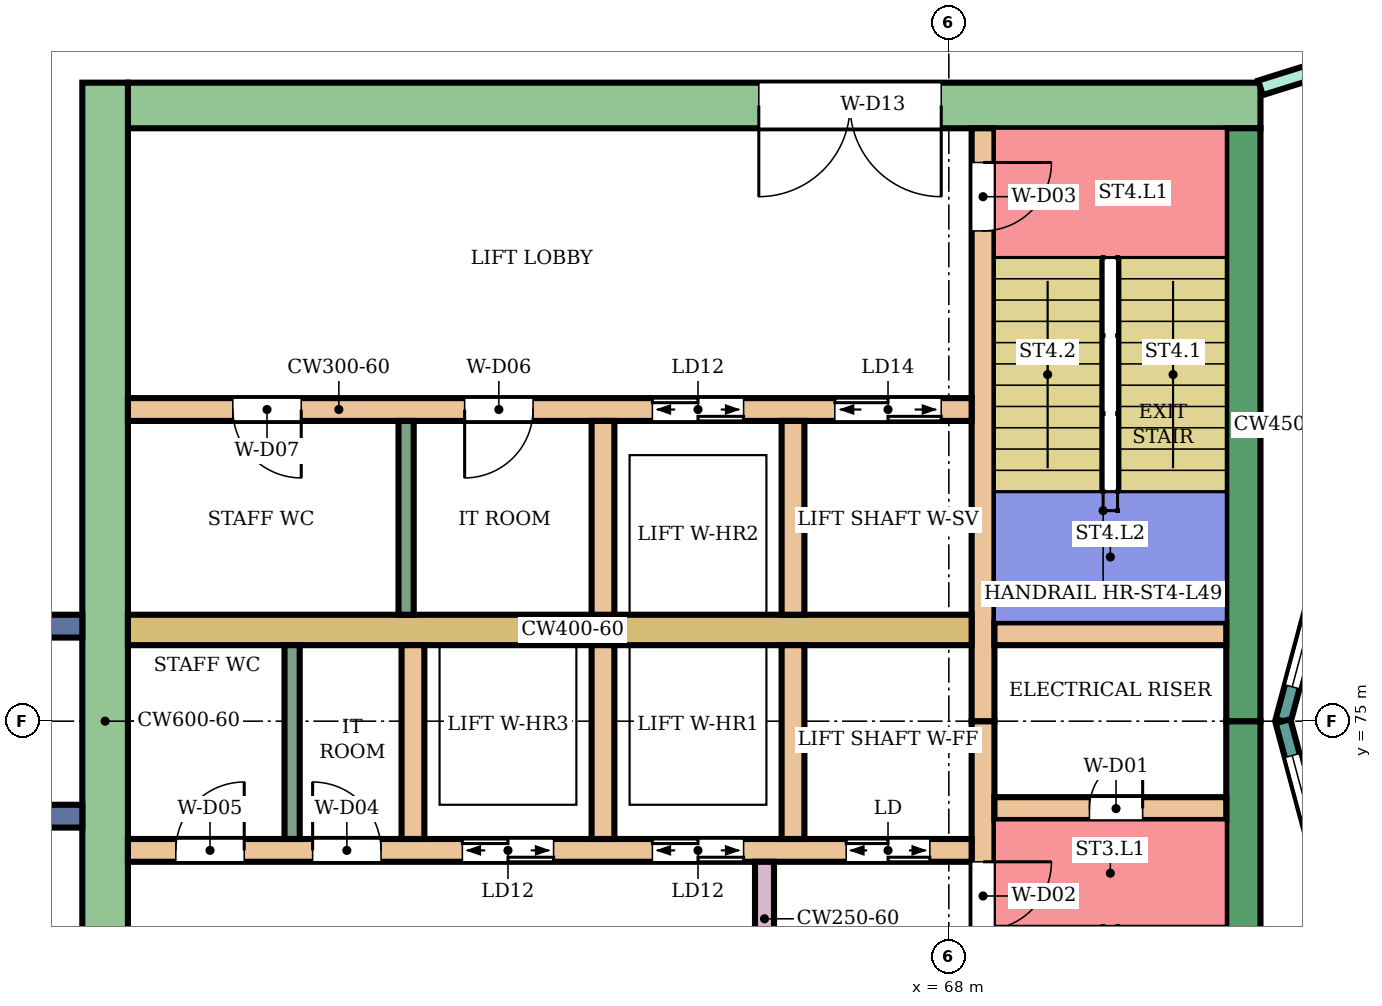
"""IFC4 building model, lengths in metres.
Left out: names, types, materials, properties, quantities, classifications, styles, units other than length and angle.
Written with IfcOpenShell. Run it as: python <this file> out.ifc"""

import sys

from ifc_helpers import new_model, si_unit, direction, frame, frame_2d, origin, place, context, subcontext, project, spatial, rectangle, extrude, element, fill, save


model = new_model("IFC4")
c1 = context("Model", 3, precision=1e-05, world=origin(), true_north=direction((0.0, 1.0)))
c2 = subcontext(c1, "Body", "Model", "MODEL_VIEW")
j1 = project(units=[si_unit("LENGTHUNIT", "METRE"), si_unit("PLANEANGLEUNIT", "RADIAN")], contexts=[c1])
p1 = place(None, origin())
s1 = spatial("IfcSite", under=j1, at=p1, CompositionType="ELEMENT")
p2 = place(p1, origin())
s2 = spatial("IfcBuilding", under=s1, at=p2, CompositionType="ELEMENT")
p3 = place(p2, frame((0.0, 0.0, 212.5)))
s3 = spatial("IfcBuildingStorey", under=s2, at=p3, CompositionType="ELEMENT", Elevation=212.5)
p4 = place(p3, frame((72.1, 83.1, 0.0), z_axis=(0.0, 0.0, 1.0), x_axis=(-1.0, 0.0, 0.0)))
e1 = element("IfcWall", 1, at=p4, inside=s3, PredefinedType="SHEAR", context=c2, shape_type="SweptSolid", body=[
    extrude(rectangle(XDim=14.9, YDim=0.6, at=frame_2d((7.45, 0.0))), origin(), (0.0, 0.0, 1.0), 3.88),
])
p5 = place(p4, frame((4.2, 0.0, 0.0)))
e2 = element("IfcOpeningElement", 2, at=p5, cuts=e1, PredefinedType="OPENING", context=c2, shape_type="SweptSolid", body=[
    extrude(rectangle(XDim=2.4, YDim=2.4, at=frame_2d((1.2, 1.2))), frame((0.0, 0.31, 0.0), z_axis=(0.0, -1.0, 0.0), x_axis=(1.0, 0.0, 0.0)), (0.0, 0.0, 1.0), 0.62),
])
for number, where, z_axis, x_axis in (
    (3, (71.875, 75.0, 0.0), (0.0, 0.0, 1.0), (0.0, -1.0, 0.0)),
    (4, (71.875, 82.8, 0.0), (0.0, 0.0, 1.0), (0.0, -1.0, 0.0)),
):
    element("IfcWall", number, at=place(p3, frame(where, z_axis=z_axis, x_axis=x_axis)), inside=s3, PredefinedType="SHEAR", context=c2, shape_type="SweptSolid", body=[
        extrude(rectangle(XDim=7.8, YDim=0.45, at=frame_2d((3.9, 0.0))), origin(), (0.0, 0.0, 1.0), 3.88),
    ])
p6 = place(p3, frame((56.9, 83.4, 0.0), z_axis=(0.0, 0.0, 1.0), x_axis=(0.0, -1.0, 0.0)))
e5 = element("IfcWall", 5, at=p6, inside=s3, PredefinedType="SHEAR", context=c2, shape_type="SweptSolid", body=[
    extrude(rectangle(XDim=16.8, YDim=0.6, at=frame_2d((8.4, 0.0))), origin(), (0.0, 0.0, 1.0), 3.88),
])
p7 = place(p3, frame((68.45, 75.0, 0.0), z_axis=(0.0, 0.0, 1.0), x_axis=(0.0, -1.0, 0.0)))
e6 = element("IfcWall", 6, at=p7, inside=s3, PredefinedType="SHEAR", context=c2, shape_type="SweptSolid", body=[
    extrude(rectangle(XDim=7.8, YDim=0.3, at=frame_2d((3.9, 0.0))), origin(), (0.0, 0.0, 1.0), 3.88),
])
p8 = place(p7, frame((1.85, 0.0, 0.0)))
e7 = element("IfcOpeningElement", 7, at=p8, cuts=e6, PredefinedType="OPENING", context=c2, shape_type="SweptSolid", body=[
    extrude(rectangle(XDim=0.9, YDim=2.1, at=frame_2d((0.45, 1.05))), frame((0.0, 0.16, 0.0), z_axis=(0.0, -1.0, 0.0), x_axis=(1.0, 0.0, 0.0)), (0.0, 0.0, 1.0), 0.32),
])
p9 = place(p3, frame((68.45, 82.8, 0.0), z_axis=(0.0, 0.0, 1.0), x_axis=(0.0, -1.0, 0.0)))
e8 = element("IfcWall", 8, at=p9, inside=s3, PredefinedType="SHEAR", context=c2, shape_type="SweptSolid", body=[
    extrude(rectangle(XDim=7.8, YDim=0.3, at=frame_2d((3.9, 0.0))), origin(), (0.0, 0.0, 1.0), 3.88),
])
p10 = place(p9, frame((0.45, 0.0, 0.0)))
e9 = element("IfcOpeningElement", 9, at=p10, cuts=e8, PredefinedType="OPENING", context=c2, shape_type="SweptSolid", body=[
    extrude(rectangle(XDim=0.9, YDim=2.1, at=frame_2d((0.45, 1.05))), frame((0.0, 0.16, 0.0), z_axis=(0.0, -1.0, 0.0), x_axis=(1.0, 0.0, 0.0)), (0.0, 0.0, 1.0), 0.32),
])
p11 = place(p3, frame((71.65, 73.85, 0.0), z_axis=(0.0, 0.0, 1.0), x_axis=(-1.0, 0.0, 0.0)))
e10 = element("IfcWall", 10, at=p11, inside=s3, PredefinedType="SHEAR", context=c2, shape_type="SweptSolid", body=[
    extrude(rectangle(XDim=3.05, YDim=0.3, at=frame_2d((1.525, 0.0))), origin(), (0.0, 0.0, 1.0), 3.88),
])
p12 = place(p11, frame((1.1, 0.0, 0.0)))
e11 = element("IfcOpeningElement", 11, at=p12, cuts=e10, PredefinedType="OPENING", context=c2, shape_type="SweptSolid", body=[
    extrude(rectangle(XDim=0.7, YDim=2.0, at=frame_2d((0.35, 1.0))), frame((0.0, 0.16, 0.0), z_axis=(0.0, -1.0, 0.0), x_axis=(1.0, 0.0, 0.0)), (0.0, 0.0, 1.0), 0.32),
])
p13 = place(p3, frame((71.65, 76.15, 0.0), z_axis=(0.0, 0.0, 1.0), x_axis=(-1.0, 0.0, 0.0)))
e12 = element("IfcWall", 12, at=p13, inside=s3, PredefinedType="SHEAR", context=c2, shape_type="SweptSolid", body=[
    extrude(rectangle(XDim=3.05, YDim=0.3, at=frame_2d((1.525, 0.0))), origin(), (0.0, 0.0, 1.0), 3.88),
])
p14 = place(p3, frame((68.3, 73.3, 0.0), z_axis=(0.0, 0.0, 1.0), x_axis=(-1.0, 0.0, 0.0)))
e13 = element("IfcWall", 13, at=p14, inside=s3, PredefinedType="SHEAR", context=c2, shape_type="SweptSolid", body=[
    extrude(rectangle(XDim=11.1, YDim=0.3, at=frame_2d((5.55, 0.0))), origin(), (0.0, 0.0, 1.0), 3.88),
])
p15 = place(p14, frame((0.55, 0.0, 0.0)))
e14 = element("IfcOpeningElement", 14, at=p15, cuts=e13, PredefinedType="OPENING", context=c2, shape_type="SweptSolid", body=[
    extrude(rectangle(XDim=1.1, YDim=2.1, at=frame_2d((0.55, 1.05))), frame((0.0, 0.16, 0.0), z_axis=(0.0, -1.0, 0.0), x_axis=(1.0, 0.0, 0.0)), (0.0, 0.0, 1.0), 0.32),
])
p16 = place(p14, frame((3.0, 0.0, 0.0)))
e15 = element("IfcOpeningElement", 15, at=p16, cuts=e13, PredefinedType="OPENING", context=c2, shape_type="SweptSolid", body=[
    extrude(rectangle(XDim=1.2, YDim=2.1, at=frame_2d((0.6, 1.05))), frame((0.0, 0.16, 0.0), z_axis=(0.0, -1.0, 0.0), x_axis=(1.0, 0.0, 0.0)), (0.0, 0.0, 1.0), 0.32),
])
p17 = place(p14, frame((5.5, 0.0, 0.0)))
e16 = element("IfcOpeningElement", 16, at=p17, cuts=e13, PredefinedType="OPENING", context=c2, shape_type="SweptSolid", body=[
    extrude(rectangle(XDim=1.2, YDim=2.1, at=frame_2d((0.6, 1.05))), frame((0.0, 0.16, 0.0), z_axis=(0.0, -1.0, 0.0), x_axis=(1.0, 0.0, 0.0)), (0.0, 0.0, 1.0), 0.32),
])
p18 = place(p14, frame((7.77, 0.0, 0.0)))
e17 = element("IfcOpeningElement", 17, at=p18, cuts=e13, PredefinedType="OPENING", context=c2, shape_type="SweptSolid", body=[
    extrude(rectangle(XDim=0.9, YDim=2.1, at=frame_2d((0.45, 1.05))), frame((0.0, 0.16, 0.0), z_axis=(0.0, -1.0, 0.0), x_axis=(1.0, 0.0, 0.0)), (0.0, 0.0, 1.0), 0.32),
])
p19 = place(p14, frame((9.57, 0.0, 0.0)))
e18 = element("IfcOpeningElement", 18, at=p19, cuts=e13, PredefinedType="OPENING", context=c2, shape_type="SweptSolid", body=[
    extrude(rectangle(XDim=0.9, YDim=2.1, at=frame_2d((0.45, 1.05))), frame((0.0, 0.16, 0.0), z_axis=(0.0, -1.0, 0.0), x_axis=(1.0, 0.0, 0.0)), (0.0, 0.0, 1.0), 0.32),
])
p20 = place(p3, frame((68.3, 76.2, 0.0), z_axis=(0.0, 0.0, 1.0), x_axis=(-1.0, 0.0, 0.0)))
e19 = element("IfcWall", 19, at=p20, inside=s3, PredefinedType="SHEAR", context=c2, shape_type="SweptSolid", body=[
    extrude(rectangle(XDim=11.1, YDim=0.4, at=frame_2d((5.55, 0.0))), origin(), (0.0, 0.0, 1.0), 3.88),
])
p21 = place(p3, frame((68.3, 79.1, 0.0), z_axis=(0.0, 0.0, 1.0), x_axis=(-1.0, 0.0, 0.0)))
e20 = element("IfcWall", 20, at=p21, inside=s3, PredefinedType="SHEAR", context=c2, shape_type="SweptSolid", body=[
    extrude(rectangle(XDim=11.1, YDim=0.3, at=frame_2d((5.55, 0.0))), origin(), (0.0, 0.0, 1.0), 3.88),
])
p22 = place(p21, frame((0.4, 0.0, 0.0)))
e21 = element("IfcOpeningElement", 21, at=p22, cuts=e20, PredefinedType="OPENING", context=c2, shape_type="SweptSolid", body=[
    extrude(rectangle(XDim=1.4, YDim=2.1, at=frame_2d((0.7, 1.05))), frame((0.0, 0.16, 0.0), z_axis=(0.0, -1.0, 0.0), x_axis=(1.0, 0.0, 0.0)), (0.0, 0.0, 1.0), 0.32),
])
p23 = place(p21, frame((3.0, 0.0, 0.0)))
e22 = element("IfcOpeningElement", 22, at=p23, cuts=e20, PredefinedType="OPENING", context=c2, shape_type="SweptSolid", body=[
    extrude(rectangle(XDim=1.2, YDim=2.1, at=frame_2d((0.6, 1.05))), frame((0.0, 0.16, 0.0), z_axis=(0.0, -1.0, 0.0), x_axis=(1.0, 0.0, 0.0)), (0.0, 0.0, 1.0), 0.32),
])
p24 = place(p21, frame((5.77, 0.0, 0.0)))
e23 = element("IfcOpeningElement", 23, at=p24, cuts=e20, PredefinedType="OPENING", context=c2, shape_type="SweptSolid", body=[
    extrude(rectangle(XDim=0.9, YDim=2.1, at=frame_2d((0.45, 1.05))), frame((0.0, 0.16, 0.0), z_axis=(0.0, -1.0, 0.0), x_axis=(1.0, 0.0, 0.0)), (0.0, 0.0, 1.0), 0.32),
])
p25 = place(p21, frame((8.82, 0.0, 0.0)))
e24 = element("IfcOpeningElement", 24, at=p25, cuts=e20, PredefinedType="OPENING", context=c2, shape_type="SweptSolid", body=[
    extrude(rectangle(XDim=0.9, YDim=2.1, at=frame_2d((0.45, 1.05))), frame((0.0, 0.16, 0.0), z_axis=(0.0, -1.0, 0.0), x_axis=(1.0, 0.0, 0.0)), (0.0, 0.0, 1.0), 0.32),
])
for number, where, z_axis, x_axis in (
    (25, (65.95, 76.0, 0.0), (0.0, 0.0, 1.0), (0.0, -1.0, 0.0)),
    (26, (63.45, 76.0, 0.0), (0.0, 0.0, 1.0), (0.0, -1.0, 0.0)),
    (27, (60.95, 76.0, 0.0), (0.0, 0.0, 1.0), (0.0, -1.0, 0.0)),
    (28, (65.95, 78.95, 0.0), (0.0, 0.0, 1.0), (0.0, -1.0, 0.0)),
    (29, (63.45, 78.95, 0.0), (0.0, 0.0, 1.0), (0.0, -1.0, 0.0)),
):
    element("IfcWall", number, at=place(p3, frame(where, z_axis=z_axis, x_axis=x_axis)), inside=s3, PredefinedType="SHEAR", context=c2, shape_type="SweptSolid", body=[
        extrude(rectangle(XDim=2.55, YDim=0.3, at=frame_2d((1.275, 0.0))), origin(), (0.0, 0.0, 1.0), 3.88),
    ])
p26 = place(p3, frame((65.575, 73.15, 0.0), z_axis=(0.0, 0.0, 1.0), x_axis=(0.0, -1.0, 0.0)))
e30 = element("IfcWall", 30, at=p26, inside=s3, PredefinedType="SHEAR", context=c2, shape_type="SweptSolid", body=[
    extrude(rectangle(XDim=1.5, YDim=0.25, at=frame_2d((0.75, 0.0))), origin(), (0.0, 0.0, 1.0), 3.88),
])
for number, where, z_axis, x_axis in (
    (31, (56.6, 76.25, 0.0), (0.0, 0.0, 1.0), (-1.0, 0.0, 0.0)),
    (32, (56.6, 73.75, 0.0), (0.0, 0.0, 1.0), (-1.0, 0.0, 0.0)),
):
    element("IfcWall", number, at=place(p3, frame(where, z_axis=z_axis, x_axis=x_axis)), inside=s3, PredefinedType="NOTDEFINED", context=c2, shape_type="SweptSolid", body=[
        extrude(rectangle(XDim=2.416, YDim=0.3, at=frame_2d((1.208, 0.0))), origin(), (0.0, 0.0, 1.0), 4.2),
    ])
p27 = place(p3, frame((73.415, 78.802, 0.0), z_axis=(0.0, 0.0, 1.0), x_axis=(-0.258789828301, -0.965933654434, 0.0)))
e33 = element("IfcWall", 33, at=p27, inside=s3, PredefinedType="NOTDEFINED", context=c2, shape_type="SweptSolid", body=[
    extrude(rectangle(XDim=3.936, YDim=0.2, at=frame_2d((1.968, 0.0))), origin(), (0.0, 0.0, 1.0), 4.2),
])
p28 = place(p27, frame((0.468, 0.0, 0.9)))
e34 = element("IfcOpeningElement", 34, at=p28, cuts=e33, PredefinedType="OPENING", context=c2, shape_type="SweptSolid", body=[
    extrude(rectangle(XDim=3.0, YDim=2.3, at=frame_2d((1.5, 1.15))), frame((0.0, 0.11, 0.0), z_axis=(0.0, -1.0, 0.0), x_axis=(1.0, 0.0, 0.0)), (0.0, 0.0, 1.0), 0.22),
])
p29 = place(p3, frame((72.396, 75.0, 0.0), z_axis=(0.0, 0.0, 1.0), x_axis=(0.258789828301, -0.965933654434, 0.0)))
e35 = element("IfcWall", 35, at=p29, inside=s3, PredefinedType="NOTDEFINED", context=c2, shape_type="SweptSolid", body=[
    extrude(rectangle(XDim=3.936, YDim=0.2, at=frame_2d((1.968, 0.0))), origin(), (0.0, 0.0, 1.0), 4.2),
])
p30 = place(p29, frame((0.468, 0.0, 0.9)))
e36 = element("IfcOpeningElement", 36, at=p30, cuts=e35, PredefinedType="OPENING", context=c2, shape_type="SweptSolid", body=[
    extrude(rectangle(XDim=3.0, YDim=2.3, at=frame_2d((1.5, 1.15))), frame((0.0, 0.11, 0.0), z_axis=(0.0, -1.0, 0.0), x_axis=(1.0, 0.0, 0.0)), (0.0, 0.0, 1.0), 0.22),
])
p31 = place(p3, frame((72.1, 83.332, 0.0), z_axis=(0.0, 0.0, 1.0), x_axis=(0.954233106619, 0.299063836383, 0.0)))
e37 = element("IfcWall", 37, at=p31, inside=s3, PredefinedType="PARTITIONING", context=c2, shape_type="SweptSolid", body=[
    extrude(rectangle(XDim=2.414, YDim=0.2, at=frame_2d((1.207, 0.0))), origin(), (0.0, 0.0, 1.0), 3.75),
])
p32 = place(p31, frame((0.762, 0.0, 0.0)))
e38 = element("IfcOpeningElement", 38, at=p32, cuts=e37, PredefinedType="OPENING", context=c2, shape_type="SweptSolid", body=[
    extrude(rectangle(XDim=0.9, YDim=2.1, at=frame_2d((0.45, 1.05))), frame((0.0, 0.11, 0.0), z_axis=(0.0, -1.0, 0.0), x_axis=(1.0, 0.0, 0.0)), (0.0, 0.0, 1.0), 0.22),
])
for number, where, z_axis, x_axis in (
    (39, (59.36, 76.0, 0.0), (0.0, 0.0, 1.0), (0.0, -1.0, 0.0)),
    (40, (60.86, 78.95, 0.0), (0.0, 0.0, 1.0), (0.0, -1.0, 0.0)),
):
    element("IfcWall", number, at=place(p3, frame(where, z_axis=z_axis, x_axis=x_axis)), inside=s3, PredefinedType="PARTITIONING", context=c2, shape_type="SweptSolid", body=[
        extrude(rectangle(XDim=2.55, YDim=0.2, at=frame_2d((1.275, 0.0))), origin(), (0.0, 0.0, 1.0), 3.88),
    ])
p33 = place(p28, origin())
e41 = element("IfcWindow", 41, at=p33, inside=s3, PartitioningType="SINGLE_PANEL", PredefinedType="WINDOW", context=c2, shape_type="SweptSolid", body=[
    extrude(rectangle(XDim=3.0, YDim=2.3, at=frame_2d((1.5, 1.15))), frame((0.0, 0.03, 0.0), z_axis=(0.0, -1.0, 0.0), x_axis=(1.0, 0.0, 0.0)), (0.0, 0.0, 1.0), 0.06),
])
fill(e34, e41)
p34 = place(p30, origin())
e42 = element("IfcWindow", 42, at=p34, inside=s3, PartitioningType="SINGLE_PANEL", PredefinedType="WINDOW", context=c2, shape_type="SweptSolid", body=[
    extrude(rectangle(XDim=3.0, YDim=2.3, at=frame_2d((1.5, 1.15))), frame((0.0, 0.03, 0.0), z_axis=(0.0, -1.0, 0.0), x_axis=(1.0, 0.0, 0.0)), (0.0, 0.0, 1.0), 0.06),
])
fill(e36, e42)
p35 = place(p12, frame((0.7, 0.0, 0.0), z_axis=(0.0, 0.0, 1.0), x_axis=(-1.0, 0.0, 0.0)))
e43 = element("IfcDoor", 43, at=p35, inside=s3, OperationType="SINGLE_SWING_RIGHT", PredefinedType="DOOR", context=c2, shape_type="SweptSolid", body=[
    extrude(rectangle(XDim=0.7, YDim=2.0, at=frame_2d((0.35, 1.0))), frame((0.0, 0.025, 0.0), z_axis=(0.0, -1.0, 0.0), x_axis=(1.0, 0.0, 0.0)), (0.0, 0.0, 1.0), 0.05),
])
fill(e11, e43)
p36 = place(p8, origin())
e44 = element("IfcDoor", 44, at=p36, inside=s3, OperationType="SINGLE_SWING_LEFT", PredefinedType="DOOR", context=c2, shape_type="SweptSolid", body=[
    extrude(rectangle(XDim=0.9, YDim=2.1, at=frame_2d((0.45, 1.05))), frame((0.0, 0.025, 0.0), z_axis=(0.0, -1.0, 0.0), x_axis=(1.0, 0.0, 0.0)), (0.0, 0.0, 1.0), 0.05),
])
fill(e7, e44)
p37 = place(p10, origin())
e45 = element("IfcDoor", 45, at=p37, inside=s3, OperationType="SINGLE_SWING_LEFT", PredefinedType="DOOR", context=c2, shape_type="SweptSolid", body=[
    extrude(rectangle(XDim=0.9, YDim=2.1, at=frame_2d((0.45, 1.05))), frame((0.0, 0.025, 0.0), z_axis=(0.0, -1.0, 0.0), x_axis=(1.0, 0.0, 0.0)), (0.0, 0.0, 1.0), 0.05),
])
fill(e9, e45)
p38 = place(p15, origin())
e46 = element("IfcDoor", 46, at=p38, inside=s3, OperationType="DOUBLE_DOOR_SLIDING", PredefinedType="DOOR", context=c2, shape_type="SweptSolid", body=[
    extrude(rectangle(XDim=1.1, YDim=2.1, at=frame_2d((0.55, 1.05))), frame((0.0, 0.025, 0.0), z_axis=(0.0, -1.0, 0.0), x_axis=(1.0, 0.0, 0.0)), (0.0, 0.0, 1.0), 0.05),
])
fill(e14, e46)
p39 = place(p16, origin())
e47 = element("IfcDoor", 47, at=p39, inside=s3, OperationType="DOUBLE_DOOR_SLIDING", PredefinedType="DOOR", context=c2, shape_type="SweptSolid", body=[
    extrude(rectangle(XDim=1.2, YDim=2.1, at=frame_2d((0.6, 1.05))), frame((0.0, 0.025, 0.0), z_axis=(0.0, -1.0, 0.0), x_axis=(1.0, 0.0, 0.0)), (0.0, 0.0, 1.0), 0.05),
])
fill(e15, e47)
p40 = place(p17, origin())
e48 = element("IfcDoor", 48, at=p40, inside=s3, OperationType="DOUBLE_DOOR_SLIDING", PredefinedType="DOOR", context=c2, shape_type="SweptSolid", body=[
    extrude(rectangle(XDim=1.2, YDim=2.1, at=frame_2d((0.6, 1.05))), frame((0.0, 0.025, 0.0), z_axis=(0.0, -1.0, 0.0), x_axis=(1.0, 0.0, 0.0)), (0.0, 0.0, 1.0), 0.05),
])
fill(e16, e48)
p41 = place(p18, frame((0.9, 0.0, 0.0), z_axis=(0.0, 0.0, 1.0), x_axis=(-1.0, 0.0, 0.0)))
e49 = element("IfcDoor", 49, at=p41, inside=s3, OperationType="SINGLE_SWING_LEFT", PredefinedType="DOOR", context=c2, shape_type="SweptSolid", body=[
    extrude(rectangle(XDim=0.9, YDim=2.1, at=frame_2d((0.45, 1.05))), frame((0.0, 0.025, 0.0), z_axis=(0.0, -1.0, 0.0), x_axis=(1.0, 0.0, 0.0)), (0.0, 0.0, 1.0), 0.05),
])
fill(e17, e49)
p42 = place(p19, frame((0.9, 0.0, 0.0), z_axis=(0.0, 0.0, 1.0), x_axis=(-1.0, 0.0, 0.0)))
e50 = element("IfcDoor", 50, at=p42, inside=s3, OperationType="SINGLE_SWING_RIGHT", PredefinedType="DOOR", context=c2, shape_type="SweptSolid", body=[
    extrude(rectangle(XDim=0.9, YDim=2.1, at=frame_2d((0.45, 1.05))), frame((0.0, 0.025, 0.0), z_axis=(0.0, -1.0, 0.0), x_axis=(1.0, 0.0, 0.0)), (0.0, 0.0, 1.0), 0.05),
])
fill(e18, e50)
p43 = place(p22, origin())
e51 = element("IfcDoor", 51, at=p43, inside=s3, OperationType="DOUBLE_DOOR_SLIDING", PredefinedType="DOOR", context=c2, shape_type="SweptSolid", body=[
    extrude(rectangle(XDim=1.4, YDim=2.1, at=frame_2d((0.7, 1.05))), frame((0.0, 0.025, 0.0), z_axis=(0.0, -1.0, 0.0), x_axis=(1.0, 0.0, 0.0)), (0.0, 0.0, 1.0), 0.05),
])
fill(e21, e51)
p44 = place(p23, origin())
e52 = element("IfcDoor", 52, at=p44, inside=s3, OperationType="DOUBLE_DOOR_SLIDING", PredefinedType="DOOR", context=c2, shape_type="SweptSolid", body=[
    extrude(rectangle(XDim=1.2, YDim=2.1, at=frame_2d((0.6, 1.05))), frame((0.0, 0.025, 0.0), z_axis=(0.0, -1.0, 0.0), x_axis=(1.0, 0.0, 0.0)), (0.0, 0.0, 1.0), 0.05),
])
fill(e22, e52)
p45 = place(p24, origin())
e53 = element("IfcDoor", 53, at=p45, inside=s3, OperationType="SINGLE_SWING_RIGHT", PredefinedType="DOOR", context=c2, shape_type="SweptSolid", body=[
    extrude(rectangle(XDim=0.9, YDim=2.1, at=frame_2d((0.45, 1.05))), frame((0.0, 0.025, 0.0), z_axis=(0.0, -1.0, 0.0), x_axis=(1.0, 0.0, 0.0)), (0.0, 0.0, 1.0), 0.05),
])
fill(e23, e53)
p46 = place(p25, origin())
e54 = element("IfcDoor", 54, at=p46, inside=s3, OperationType="SINGLE_SWING_LEFT", PredefinedType="DOOR", context=c2, shape_type="SweptSolid", body=[
    extrude(rectangle(XDim=0.9, YDim=2.1, at=frame_2d((0.45, 1.05))), frame((0.0, 0.025, 0.0), z_axis=(0.0, -1.0, 0.0), x_axis=(1.0, 0.0, 0.0)), (0.0, 0.0, 1.0), 0.05),
])
fill(e24, e54)
p47 = place(p5, origin())
e55 = element("IfcDoor", 55, at=p47, inside=s3, OperationType="DOUBLE_DOOR_SINGLE_SWING", PredefinedType="DOOR", context=c2, shape_type="SweptSolid", body=[
    extrude(rectangle(XDim=2.4, YDim=2.4, at=frame_2d((1.2, 1.2))), frame((0.0, 0.025, 0.0), z_axis=(0.0, -1.0, 0.0), x_axis=(1.0, 0.0, 0.0)), (0.0, 0.0, 1.0), 0.05),
])
fill(e2, e55)
save(model, sys.argv[1])
